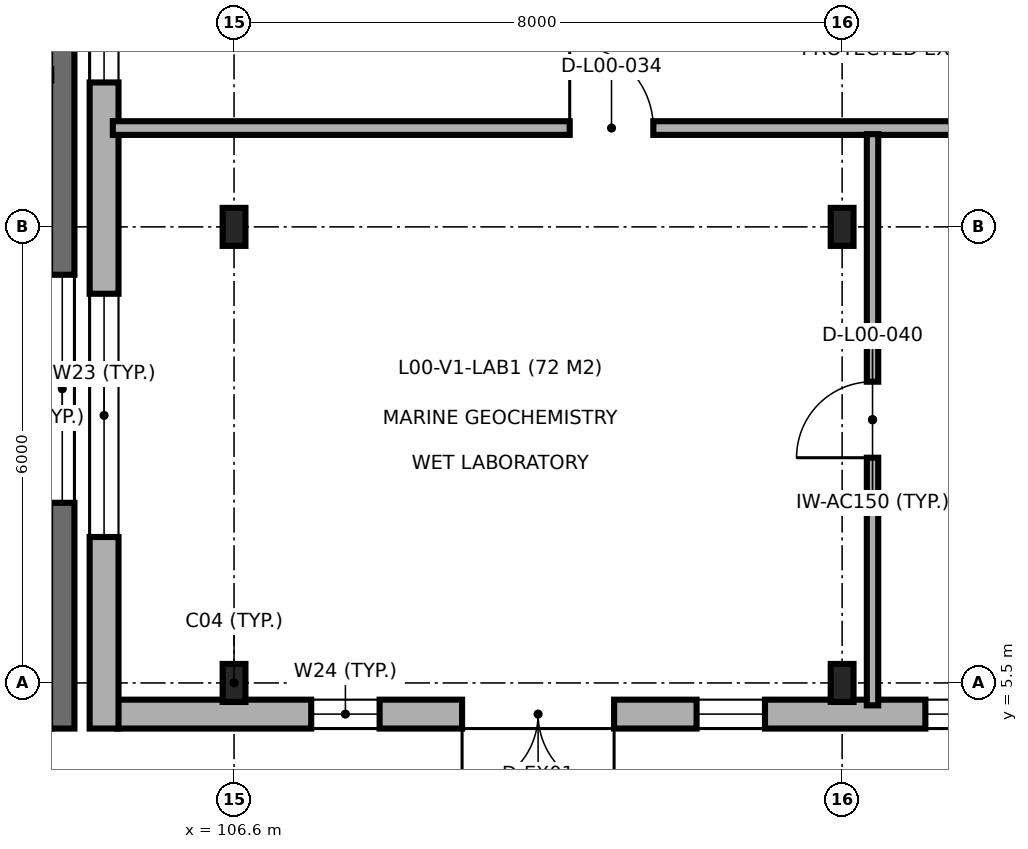
"""IFC4 building model, lengths in metres.
Left out: names, types, materials, properties, quantities, classifications, styles, units other than length and angle.
Written with IfcOpenShell. Run it as: python <this file> out.ifc"""

import sys

from ifc_helpers import new_model, si_unit, direction, frame, frame_2d, origin, origin_2d, place, context, subcontext, project, spatial, rectangle, i_section, extrude, element, fill, save


model = new_model("IFC4")
c1 = context("Model", 3, precision=1e-05, world=origin(), true_north=direction((0.0, 1.0)))
c2 = subcontext(c1, "Body", "Model", "MODEL_VIEW")
j1 = project(units=[si_unit("LENGTHUNIT", "METRE"), si_unit("PLANEANGLEUNIT", "RADIAN")], contexts=[c1])
p1 = place(None, origin())
s1 = spatial("IfcSite", under=j1, at=p1, CompositionType="ELEMENT")
p2 = place(p1, origin())
s2 = spatial("IfcBuilding", under=s1, at=p2, CompositionType="ELEMENT")
p3 = place(p2, origin())
s3 = spatial("IfcBuildingStorey", under=s2, at=p3, CompositionType="ELEMENT", Elevation=0.0)
for number, where, z_axis, x_axis in (
    (1, (106.6, 5.5, 0.0), (0.0, 0.0, 1.0), (1.0, 0.0, 0.0)),
    (2, (106.6, 11.5, 0.0), (0.0, 0.0, 1.0), (1.0, 0.0, 0.0)),
    (3, (114.6, 5.5, 0.0), (0.0, 0.0, 1.0), (1.0, 0.0, 0.0)),
    (4, (114.6, 11.5, 0.0), (0.0, 0.0, 1.0), (1.0, 0.0, 0.0)),
):
    element("IfcColumn", number, at=place(p3, frame(where, z_axis=z_axis, x_axis=x_axis)), inside=s3, PredefinedType="COLUMN", context=c2, shape_type="SweptSolid", body=[
        extrude(i_section(OverallWidth=0.3, OverallDepth=0.5, WebThickness=0.014, FlangeThickness=0.028, FilletRadius=0.027, at=origin_2d()), origin(), (0.0, 0.0, 1.0), 4.8),
    ])
p4 = place(p3, frame((105.062, 5.09, 0.0), z_axis=(0.0, 0.0, 1.0), x_axis=(1.0, 0.0, 0.0)))
e5 = element("IfcWall", 5, at=p4, inside=s3, PredefinedType="SOLIDWALL", context=c2, shape_type="SweptSolid", body=[
    extrude(rectangle(XDim=59.338, YDim=0.38, at=frame_2d((29.669, 0.0))), origin(), (0.0, 0.0, 1.0), 4.55),
])
p5 = place(p4, frame((4.538, 0.0, 0.0)))
e6 = element("IfcOpeningElement", 6, at=p5, cuts=e5, PredefinedType="OPENING", context=c2, shape_type="SweptSolid", body=[
    extrude(rectangle(XDim=2.0, YDim=2.4, at=frame_2d((1.0, 1.2))), frame((0.0, 0.2, 0.0), z_axis=(0.0, -1.0, 0.0), x_axis=(1.0, 0.0, 0.0)), (0.0, 0.0, 1.0), 0.4),
])
p6 = place(p4, frame((20.538, 0.0, 0.0)))
e7 = element("IfcOpeningElement", 7, at=p6, cuts=e5, PredefinedType="OPENING", context=c2, shape_type="SweptSolid", body=[
    extrude(rectangle(XDim=2.0, YDim=2.4, at=frame_2d((1.0, 1.2))), frame((0.0, 0.2, 0.0), z_axis=(0.0, -1.0, 0.0), x_axis=(1.0, 0.0, 0.0)), (0.0, 0.0, 1.0), 0.4),
])
p7 = place(p4, frame((12.538, 0.0, 0.0)))
e8 = element("IfcOpeningElement", 8, at=p7, cuts=e5, PredefinedType="OPENING", context=c2, shape_type="SweptSolid", body=[
    extrude(rectangle(XDim=2.0, YDim=2.4, at=frame_2d((1.0, 1.2))), frame((0.0, 0.2, 0.0), z_axis=(0.0, -1.0, 0.0), x_axis=(1.0, 0.0, 0.0)), (0.0, 0.0, 1.0), 0.4),
])
p8 = place(p4, frame((2.553, 0.0, 0.9)))
e9 = element("IfcOpeningElement", 9, at=p8, cuts=e5, PredefinedType="OPENING", context=c2, shape_type="SweptSolid", body=[
    extrude(rectangle(XDim=0.9, YDim=1.8, at=frame_2d((0.45, 0.9))), frame((0.0, 0.2, 0.0), z_axis=(0.0, -1.0, 0.0), x_axis=(1.0, 0.0, 0.0)), (0.0, 0.0, 1.0), 0.4),
])
p9 = place(p4, frame((7.623, 0.0, 0.9)))
e10 = element("IfcOpeningElement", 10, at=p9, cuts=e5, PredefinedType="OPENING", context=c2, shape_type="SweptSolid", body=[
    extrude(rectangle(XDim=0.9, YDim=1.8, at=frame_2d((0.45, 0.9))), frame((0.0, 0.2, 0.0), z_axis=(0.0, -1.0, 0.0), x_axis=(1.0, 0.0, 0.0)), (0.0, 0.0, 1.0), 0.4),
])
p10 = place(p4, frame((10.633, 0.0, 0.9)))
e11 = element("IfcOpeningElement", 11, at=p10, cuts=e5, PredefinedType="OPENING", context=c2, shape_type="SweptSolid", body=[
    extrude(rectangle(XDim=0.9, YDim=1.8, at=frame_2d((0.45, 0.9))), frame((0.0, 0.2, 0.0), z_axis=(0.0, -1.0, 0.0), x_axis=(1.0, 0.0, 0.0)), (0.0, 0.0, 1.0), 0.4),
])
p11 = place(p4, frame((15.623, 0.0, 0.9)))
e12 = element("IfcOpeningElement", 12, at=p11, cuts=e5, PredefinedType="OPENING", context=c2, shape_type="SweptSolid", body=[
    extrude(rectangle(XDim=0.9, YDim=1.8, at=frame_2d((0.45, 0.9))), frame((0.0, 0.2, 0.0), z_axis=(0.0, -1.0, 0.0), x_axis=(1.0, 0.0, 0.0)), (0.0, 0.0, 1.0), 0.4),
])
p12 = place(p4, frame((18.553, 0.0, 0.9)))
e13 = element("IfcOpeningElement", 13, at=p12, cuts=e5, PredefinedType="OPENING", context=c2, shape_type="SweptSolid", body=[
    extrude(rectangle(XDim=0.9, YDim=1.8, at=frame_2d((0.45, 0.9))), frame((0.0, 0.2, 0.0), z_axis=(0.0, -1.0, 0.0), x_axis=(1.0, 0.0, 0.0)), (0.0, 0.0, 1.0), 0.4),
])
p13 = place(p4, frame((29.158, 0.0, 0.9)))
e14 = element("IfcOpeningElement", 14, at=p13, cuts=e5, PredefinedType="OPENING", context=c2, shape_type="SweptSolid", body=[
    extrude(rectangle(XDim=0.9, YDim=1.8, at=frame_2d((0.45, 0.9))), frame((0.0, 0.2, 0.0), z_axis=(0.0, -1.0, 0.0), x_axis=(1.0, 0.0, 0.0)), (0.0, 0.0, 1.0), 0.4),
])
p14 = place(p4, frame((45.098, 0.0, 0.9)))
e15 = element("IfcOpeningElement", 15, at=p14, cuts=e5, PredefinedType="OPENING", context=c2, shape_type="SweptSolid", body=[
    extrude(rectangle(XDim=0.9, YDim=1.8, at=frame_2d((0.45, 0.9))), frame((0.0, 0.2, 0.0), z_axis=(0.0, -1.0, 0.0), x_axis=(1.0, 0.0, 0.0)), (0.0, 0.0, 1.0), 0.4),
])
p15 = place(p4, frame((50.358, 0.0, 0.9)))
e16 = element("IfcOpeningElement", 16, at=p15, cuts=e5, PredefinedType="OPENING", context=c2, shape_type="SweptSolid", body=[
    extrude(rectangle(XDim=0.9, YDim=1.8, at=frame_2d((0.45, 0.9))), frame((0.0, 0.2, 0.0), z_axis=(0.0, -1.0, 0.0), x_axis=(1.0, 0.0, 0.0)), (0.0, 0.0, 1.0), 0.4),
])
p16 = place(p4, frame((54.968, 0.0, 0.9)))
e17 = element("IfcOpeningElement", 17, at=p16, cuts=e5, PredefinedType="OPENING", context=c2, shape_type="SweptSolid", body=[
    extrude(rectangle(XDim=0.9, YDim=1.8, at=frame_2d((0.45, 0.9))), frame((0.0, 0.2, 0.0), z_axis=(0.0, -1.0, 0.0), x_axis=(1.0, 0.0, 0.0)), (0.0, 0.0, 1.0), 0.4),
])
p17 = place(p3, frame((104.89, 23.5, 0.0), z_axis=(0.0, 0.0, 1.0), x_axis=(0.0, -1.0, 0.0)))
e18 = element("IfcWall", 18, at=p17, inside=s3, PredefinedType="SOLIDWALL", context=c2, shape_type="SweptSolid", body=[
    extrude(rectangle(XDim=18.6, YDim=0.38, at=frame_2d((9.3, 0.0))), origin(), (0.0, 0.0, 1.0), 4.55),
])
p18 = place(p17, frame((1.49, 0.0, 0.9)))
e19 = element("IfcOpeningElement", 19, at=p18, cuts=e18, PredefinedType="OPENING", context=c2, shape_type="SweptSolid", body=[
    extrude(rectangle(XDim=1.8, YDim=1.5, at=frame_2d((0.9, 0.75))), frame((0.0, 0.2, 0.0), z_axis=(0.0, -1.0, 0.0), x_axis=(1.0, 0.0, 0.0)), (0.0, 0.0, 1.0), 0.4),
])
p19 = place(p17, frame((5.77, 0.0, 0.9)))
e20 = element("IfcOpeningElement", 20, at=p19, cuts=e18, PredefinedType="OPENING", context=c2, shape_type="SweptSolid", body=[
    extrude(rectangle(XDim=1.2, YDim=2.4, at=frame_2d((0.6, 1.2))), frame((0.0, 0.2, 0.0), z_axis=(0.0, -1.0, 0.0), x_axis=(1.0, 0.0, 0.0)), (0.0, 0.0, 1.0), 0.4),
])
p20 = place(p17, frame((8.9, 0.0, 0.9)))
e21 = element("IfcOpeningElement", 21, at=p20, cuts=e18, PredefinedType="OPENING", context=c2, shape_type="SweptSolid", body=[
    extrude(rectangle(XDim=1.2, YDim=1.8, at=frame_2d((0.6, 0.9))), frame((0.0, 0.2, 0.0), z_axis=(0.0, -1.0, 0.0), x_axis=(1.0, 0.0, 0.0)), (0.0, 0.0, 1.0), 0.4),
])
p21 = place(p17, frame((12.88, 0.0, 0.9)))
e22 = element("IfcOpeningElement", 22, at=p21, cuts=e18, PredefinedType="OPENING", context=c2, shape_type="SweptSolid", body=[
    extrude(rectangle(XDim=3.2, YDim=2.4, at=frame_2d((1.6, 1.2))), frame((0.0, 0.2, 0.0), z_axis=(0.0, -1.0, 0.0), x_axis=(1.0, 0.0, 0.0)), (0.0, 0.0, 1.0), 0.4),
])
p22 = place(p3, frame((104.34, 4.9, 0.0), z_axis=(0.0, 0.0, 1.0), x_axis=(0.0, 1.0, 0.0)))
e23 = element("IfcWall", 23, at=p22, inside=s3, PredefinedType="SHEAR", context=c2, shape_type="SweptSolid", body=[
    extrude(rectangle(XDim=36.6, YDim=0.32, at=frame_2d((18.3, 0.0))), origin(), (0.0, 0.0, 1.0), 4.55),
])
p23 = place(p22, frame((2.97, 0.0, 0.9)))
e24 = element("IfcOpeningElement", 24, at=p23, cuts=e23, PredefinedType="OPENING", context=c2, shape_type="SweptSolid", body=[
    extrude(rectangle(XDim=3.0, YDim=2.1, at=frame_2d((1.5, 1.05))), frame((0.0, 0.17, 0.0), z_axis=(0.0, -1.0, 0.0), x_axis=(1.0, 0.0, 0.0)), (0.0, 0.0, 1.0), 0.34),
])
p24 = place(p22, frame((9.35, 0.0, 0.9)))
e25 = element("IfcOpeningElement", 25, at=p24, cuts=e23, PredefinedType="OPENING", context=c2, shape_type="SweptSolid", body=[
    extrude(rectangle(XDim=1.5, YDim=1.5, at=frame_2d((0.75, 0.75))), frame((0.0, 0.17, 0.0), z_axis=(0.0, -1.0, 0.0), x_axis=(1.0, 0.0, 0.0)), (0.0, 0.0, 1.0), 0.34),
])
p25 = place(p22, frame((13.9, 0.0, 0.9)))
e26 = element("IfcOpeningElement", 26, at=p25, cuts=e23, PredefinedType="OPENING", context=c2, shape_type="SweptSolid", body=[
    extrude(rectangle(XDim=2.4, YDim=1.5, at=frame_2d((1.2, 0.75))), frame((0.0, 0.17, 0.0), z_axis=(0.0, -1.0, 0.0), x_axis=(1.0, 0.0, 0.0)), (0.0, 0.0, 1.0), 0.34),
])
p26 = place(p22, frame((20.625, 0.0, 0.9)))
e27 = element("IfcOpeningElement", 27, at=p26, cuts=e23, PredefinedType="OPENING", context=c2, shape_type="SweptSolid", body=[
    extrude(rectangle(XDim=1.6, YDim=2.4, at=frame_2d((0.8, 1.2))), frame((0.0, 0.17, 0.0), z_axis=(0.0, -1.0, 0.0), x_axis=(1.0, 0.0, 0.0)), (0.0, 0.0, 1.0), 0.34),
])
p27 = place(p22, frame((24.295, 0.0, 0.9)))
e28 = element("IfcOpeningElement", 28, at=p27, cuts=e23, PredefinedType="OPENING", context=c2, shape_type="SweptSolid", body=[
    extrude(rectangle(XDim=2.6, YDim=2.4, at=frame_2d((1.3, 1.2))), frame((0.0, 0.17, 0.0), z_axis=(0.0, -1.0, 0.0), x_axis=(1.0, 0.0, 0.0)), (0.0, 0.0, 1.0), 0.34),
])
p28 = place(p22, frame((29.315, 0.0, 0.9)))
e29 = element("IfcOpeningElement", 29, at=p28, cuts=e23, PredefinedType="OPENING", context=c2, shape_type="SweptSolid", body=[
    extrude(rectangle(XDim=0.9, YDim=1.8, at=frame_2d((0.45, 0.9))), frame((0.0, 0.17, 0.0), z_axis=(0.0, -1.0, 0.0), x_axis=(1.0, 0.0, 0.0)), (0.0, 0.0, 1.0), 0.34),
])
p29 = place(p22, frame((32.235, 0.0, 0.9)))
e30 = element("IfcOpeningElement", 30, at=p29, cuts=e23, PredefinedType="OPENING", context=c2, shape_type="SweptSolid", body=[
    extrude(rectangle(XDim=3.4, YDim=1.95, at=frame_2d((1.7, 0.975))), frame((0.0, 0.17, 0.0), z_axis=(0.0, -1.0, 0.0), x_axis=(1.0, 0.0, 0.0)), (0.0, 0.0, 1.0), 0.34),
])
p30 = place(p3, frame((105.005, 12.8, 0.0), z_axis=(0.0, 0.0, 1.0), x_axis=(1.0, 0.0, 0.0)))
e31 = element("IfcWall", 31, at=p30, inside=s3, PredefinedType="PARTITIONING", context=c2, shape_type="SweptSolid", body=[
    extrude(rectangle(XDim=34.495, YDim=0.18, at=frame_2d((17.248, 0.0))), origin(), (0.0, 0.0, 1.0), 4.55),
])
p31 = place(p30, frame((6.011, 0.0, 0.0)))
e32 = element("IfcOpeningElement", 32, at=p31, cuts=e31, PredefinedType="OPENING", context=c2, shape_type="SweptSolid", body=[
    extrude(rectangle(XDim=1.1, YDim=2.15, at=frame_2d((0.55, 1.075))), frame((0.0, 0.1, 0.0), z_axis=(0.0, -1.0, 0.0), x_axis=(1.0, 0.0, 0.0)), (0.0, 0.0, 1.0), 0.2),
])
p32 = place(p30, frame((11.548, 0.0, 0.0)))
e33 = element("IfcOpeningElement", 33, at=p32, cuts=e31, PredefinedType="OPENING", context=c2, shape_type="SweptSolid", body=[
    extrude(rectangle(XDim=1.5, YDim=2.2, at=frame_2d((0.75, 1.1))), frame((0.0, 0.1, 0.0), z_axis=(0.0, -1.0, 0.0), x_axis=(1.0, 0.0, 0.0)), (0.0, 0.0, 1.0), 0.2),
])
p33 = place(p30, frame((27.548, 0.0, 0.0)))
e34 = element("IfcOpeningElement", 34, at=p33, cuts=e31, PredefinedType="OPENING", context=c2, shape_type="SweptSolid", body=[
    extrude(rectangle(XDim=0.9, YDim=2.1, at=frame_2d((0.45, 1.05))), frame((0.0, 0.1, 0.0), z_axis=(0.0, -1.0, 0.0), x_axis=(1.0, 0.0, 0.0)), (0.0, 0.0, 1.0), 0.2),
])
p34 = place(p3, frame((115.0, 5.205, 0.0), z_axis=(0.0, 0.0, 1.0), x_axis=(0.0, 1.0, 0.0)))
e35 = element("IfcWall", 35, at=p34, inside=s3, PredefinedType="PARTITIONING", context=c2, shape_type="SweptSolid", body=[
    extrude(rectangle(XDim=7.515, YDim=0.15, at=frame_2d((3.757, 0.0))), origin(), (0.0, 0.0, 1.0), 4.55),
])
p35 = place(p34, frame((3.258, 0.0, 0.0)))
e36 = element("IfcOpeningElement", 36, at=p35, cuts=e35, PredefinedType="OPENING", context=c2, shape_type="SweptSolid", body=[
    extrude(rectangle(XDim=1.0, YDim=2.15, at=frame_2d((0.5, 1.075))), frame((0.0, 0.085, 0.0), z_axis=(0.0, -1.0, 0.0), x_axis=(1.0, 0.0, 0.0)), (0.0, 0.0, 1.0), 0.17),
])
p36 = place(p5, frame((2.0, 0.0, 0.0), z_axis=(0.0, 0.0, 1.0), x_axis=(-1.0, 0.0, 0.0)))
e37 = element("IfcDoor", 37, at=p36, inside=s3, OperationType="DOUBLE_DOOR_SINGLE_SWING", PredefinedType="DOOR", context=c2, shape_type="SweptSolid", body=[
    extrude(rectangle(XDim=2.0, YDim=2.4, at=frame_2d((1.0, 1.2))), frame((0.0, 0.025, 0.0), z_axis=(0.0, -1.0, 0.0), x_axis=(1.0, 0.0, 0.0)), (0.0, 0.0, 1.0), 0.05),
])
fill(e6, e37)
p37 = place(p8, origin())
e38 = element("IfcWindow", 38, at=p37, inside=s3, PartitioningType="SINGLE_PANEL", PredefinedType="WINDOW", context=c2, shape_type="SweptSolid", body=[
    extrude(rectangle(XDim=0.9, YDim=1.8, at=frame_2d((0.45, 0.9))), frame((0.0, 0.03, 0.0), z_axis=(0.0, -1.0, 0.0), x_axis=(1.0, 0.0, 0.0)), (0.0, 0.0, 1.0), 0.06),
])
fill(e9, e38)
p38 = place(p9, origin())
e39 = element("IfcWindow", 39, at=p38, inside=s3, PartitioningType="SINGLE_PANEL", PredefinedType="WINDOW", context=c2, shape_type="SweptSolid", body=[
    extrude(rectangle(XDim=0.9, YDim=1.8, at=frame_2d((0.45, 0.9))), frame((0.0, 0.03, 0.0), z_axis=(0.0, -1.0, 0.0), x_axis=(1.0, 0.0, 0.0)), (0.0, 0.0, 1.0), 0.06),
])
fill(e10, e39)
p39 = place(p10, origin())
e40 = element("IfcWindow", 40, at=p39, inside=s3, PartitioningType="SINGLE_PANEL", PredefinedType="WINDOW", context=c2, shape_type="SweptSolid", body=[
    extrude(rectangle(XDim=0.9, YDim=1.8, at=frame_2d((0.45, 0.9))), frame((0.0, 0.03, 0.0), z_axis=(0.0, -1.0, 0.0), x_axis=(1.0, 0.0, 0.0)), (0.0, 0.0, 1.0), 0.06),
])
fill(e11, e40)
p40 = place(p20, origin())
e41 = element("IfcWindow", 41, at=p40, inside=s3, PartitioningType="SINGLE_PANEL", PredefinedType="WINDOW", context=c2, shape_type="SweptSolid", body=[
    extrude(rectangle(XDim=1.2, YDim=1.8, at=frame_2d((0.6, 0.9))), frame((0.0, 0.03, 0.0), z_axis=(0.0, -1.0, 0.0), x_axis=(1.0, 0.0, 0.0)), (0.0, 0.0, 1.0), 0.06),
])
fill(e21, e41)
p41 = place(p21, origin())
e42 = element("IfcWindow", 42, at=p41, inside=s3, PartitioningType="SINGLE_PANEL", PredefinedType="WINDOW", context=c2, shape_type="SweptSolid", body=[
    extrude(rectangle(XDim=3.2, YDim=2.4, at=frame_2d((1.6, 1.2))), frame((0.0, 0.03, 0.0), z_axis=(0.0, -1.0, 0.0), x_axis=(1.0, 0.0, 0.0)), (0.0, 0.0, 1.0), 0.06),
])
fill(e22, e42)
p42 = place(p23, origin())
e43 = element("IfcWindow", 43, at=p42, inside=s3, PartitioningType="SINGLE_PANEL", PredefinedType="WINDOW", context=c2, shape_type="SweptSolid", body=[
    extrude(rectangle(XDim=3.0, YDim=2.1, at=frame_2d((1.5, 1.05))), frame((0.0, 0.03, 0.0), z_axis=(0.0, -1.0, 0.0), x_axis=(1.0, 0.0, 0.0)), (0.0, 0.0, 1.0), 0.06),
])
fill(e24, e43)
p43 = place(p31, origin())
e44 = element("IfcDoor", 44, at=p43, inside=s3, OperationType="SINGLE_SWING_LEFT", PredefinedType="DOOR", context=c2, shape_type="SweptSolid", body=[
    extrude(rectangle(XDim=1.1, YDim=2.15, at=frame_2d((0.55, 1.075))), frame((0.0, 0.025, 0.0), z_axis=(0.0, -1.0, 0.0), x_axis=(1.0, 0.0, 0.0)), (0.0, 0.0, 1.0), 0.05),
])
fill(e32, e44)
p44 = place(p35, origin())
e45 = element("IfcDoor", 45, at=p44, inside=s3, OperationType="SINGLE_SWING_LEFT", PredefinedType="DOOR", context=c2, shape_type="SweptSolid", body=[
    extrude(rectangle(XDim=1.0, YDim=2.15, at=frame_2d((0.5, 1.075))), frame((0.0, 0.025, 0.0), z_axis=(0.0, -1.0, 0.0), x_axis=(1.0, 0.0, 0.0)), (0.0, 0.0, 1.0), 0.05),
])
fill(e36, e45)
save(model, sys.argv[1])
